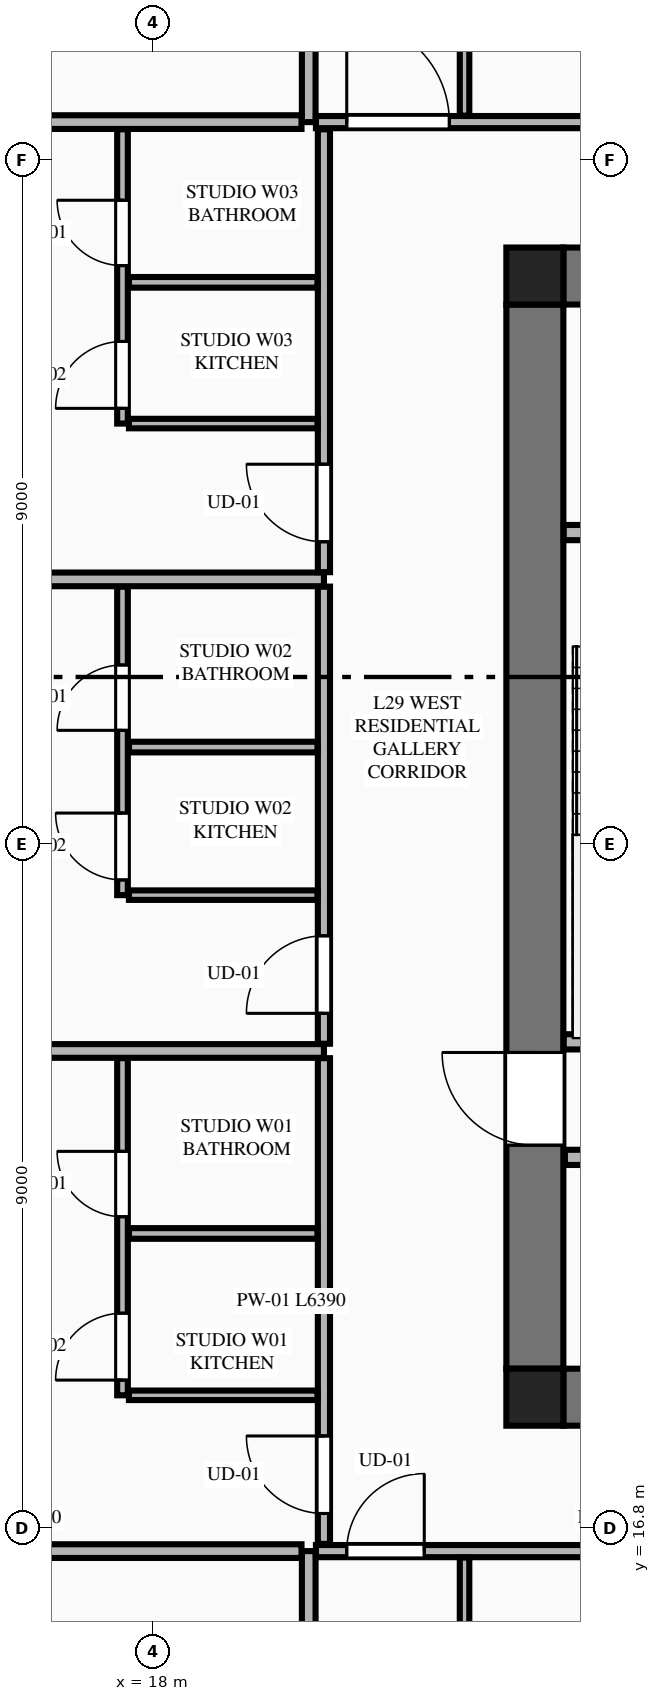
"""IFC4 building model, lengths in metres.
Left out: names, types, materials, properties, quantities, classifications, styles, units other than length and angle.
Written with IfcOpenShell. Run it as: python <this file> out.ifc"""

import sys

from ifc_helpers import new_model, si_unit, direction, frame, frame_2d, origin, origin_2d, place, context, subcontext, project, spatial, rectangle, extrude, element, fill, save


model = new_model("IFC4")
c1 = context("Model", 3, precision=1e-05, world=origin(), true_north=direction((0.0, 1.0)))
c2 = subcontext(c1, "Body", "Model", "MODEL_VIEW")
j1 = project(units=[si_unit("LENGTHUNIT", "METRE"), si_unit("PLANEANGLEUNIT", "RADIAN")], contexts=[c1])
p1 = place(None, origin())
s1 = spatial("IfcSite", under=j1, at=p1, CompositionType="ELEMENT")
p2 = place(p1, origin())
s2 = spatial("IfcBuilding", under=s1, at=p2, CompositionType="ELEMENT")
p3 = place(p2, frame((0.0, 0.0, 112.6)))
s3 = spatial("IfcBuildingStorey", under=s2, at=p3, CompositionType="ELEMENT", Elevation=112.6)
for number, where, z_axis, x_axis in (
    (1, (23.025, 18.525, 0.0), (0.0, 0.0, 1.0), (1.0, 0.0, 0.0)),
    (2, (23.025, 33.275, 0.0), (0.0, 0.0, 1.0), (1.0, 0.0, 0.0)),
):
    element("IfcColumn", number, at=place(p3, frame(where, z_axis=z_axis, x_axis=x_axis)), inside=s3, PredefinedType="COLUMN", context=c2, shape_type="SweptSolid", body=[
        extrude(rectangle(XDim=0.75, YDim=0.75, at=origin_2d()), origin(), (0.0, 0.0, 1.0), 3.55),
    ])
for number, where, z_axis, x_axis in (
    (3, (23.4, 18.525, 0.0), (0.0, 0.0, 1.0), (1.0, 0.0, 0.0)),
    (4, (23.4, 33.275, 0.0), (0.0, 0.0, 1.0), (1.0, 0.0, 0.0)),
):
    element("IfcWall", number, at=place(p3, frame(where, z_axis=z_axis, x_axis=x_axis)), inside=s3, PredefinedType="SHEAR", context=c2, shape_type="SweptSolid", body=[
        extrude(rectangle(XDim=18.0, YDim=0.75, at=frame_2d((9.0, 0.0))), origin(), (0.0, 0.0, 1.0), 3.34),
    ])
p4 = place(p3, frame((23.025, 18.9, 0.0), z_axis=(0.0, 0.0, 1.0), x_axis=(0.0, 1.0, 0.0)))
e5 = element("IfcWall", 5, at=p4, inside=s3, PredefinedType="SHEAR", context=c2, shape_type="SweptSolid", body=[
    extrude(rectangle(XDim=14.0, YDim=0.75, at=frame_2d((7.0, 0.0))), origin(), (0.0, 0.0, 1.0), 3.34),
])
p5 = place(p4, frame((2.94, 0.0, 0.0)))
e6 = element("IfcOpeningElement", 6, at=p5, cuts=e5, PredefinedType="OPENING", context=c2, shape_type="SweptSolid", body=[
    extrude(rectangle(XDim=1.22, YDim=2.25, at=frame_2d((0.61, 1.125))), frame((0.0, 0.385, 0.0), z_axis=(0.0, -1.0, 0.0), x_axis=(1.0, 0.0, 0.0)), (0.0, 0.0, 1.0), 0.77),
])
p6 = place(p3, frame((23.405, 23.2, 0.0), z_axis=(0.0, 0.0, 1.0), x_axis=(1.0, 0.0, 0.0)))
e7 = element("IfcWall", 7, at=p6, inside=s3, PredefinedType="PLUMBINGWALL", context=c2, shape_type="SweptSolid", body=[
    extrude(rectangle(XDim=3.27, YDim=0.2, at=frame_2d((1.635, 0.0))), origin(), (0.0, 0.0, 1.0), 3.34),
])
p7 = place(p3, frame((23.405, 29.9, 0.0), z_axis=(0.0, 0.0, 1.0), x_axis=(1.0, 0.0, 0.0)))
e8 = element("IfcWall", 8, at=p7, inside=s3, PredefinedType="PLUMBINGWALL", context=c2, shape_type="SweptSolid", body=[
    extrude(rectangle(XDim=3.27, YDim=0.2, at=frame_2d((1.635, 0.0))), origin(), (0.0, 0.0, 1.0), 3.34),
])
p8 = place(p7, frame((1.85, 0.0, 0.0)))
e9 = element("IfcOpeningElement", 9, at=p8, cuts=e8, PredefinedType="OPENING", context=c2, shape_type="SweptSolid", body=[
    extrude(rectangle(XDim=0.85, YDim=2.05, at=frame_2d((0.425, 1.025))), frame((0.0, 0.11, 0.0), z_axis=(0.0, -1.0, 0.0), x_axis=(1.0, 0.0, 0.0)), (0.0, 0.0, 1.0), 0.22),
])
p9 = place(p3, frame((23.42, 21.68, 0.0), z_axis=(0.0, 0.0, 1.0), x_axis=(1.0, 0.0, 0.0)))
e10 = element("IfcWall", 10, at=p9, inside=s3, PredefinedType="PLUMBINGWALL", context=c2, shape_type="SweptSolid", body=[
    extrude(rectangle(XDim=17.96, YDim=0.2, at=frame_2d((8.98, 0.0))), origin(), (0.0, 0.0, 1.0), 3.34),
])
p10 = place(p9, frame((11.6, 0.0, 0.0)))
e11 = element("IfcOpeningElement", 11, at=p10, cuts=e10, PredefinedType="OPENING", context=c2, shape_type="SweptSolid", body=[
    extrude(rectangle(XDim=1.1, YDim=2.2, at=frame_2d((0.55, 1.1))), frame((0.0, 0.11, 0.0), z_axis=(0.0, -1.0, 0.0), x_axis=(1.0, 0.0, 0.0)), (0.0, 0.0, 1.0), 0.22),
])
p11 = place(p9, frame((0.41, 0.0, 0.0)))
e12 = element("IfcOpeningElement", 12, at=p11, cuts=e10, PredefinedType="OPENING", context=c2, shape_type="SweptSolid", body=[
    extrude(rectangle(XDim=0.85, YDim=2.05, at=frame_2d((0.425, 1.025))), frame((0.0, 0.11, 0.0), z_axis=(0.0, -1.0, 0.0), x_axis=(1.0, 0.0, 0.0)), (0.0, 0.0, 1.0), 0.22),
])
p12 = place(p9, frame((13.78, 0.0, 0.0)))
e13 = element("IfcOpeningElement", 13, at=p12, cuts=e10, PredefinedType="OPENING", context=c2, shape_type="SweptSolid", body=[
    extrude(rectangle(XDim=0.85, YDim=2.05, at=frame_2d((0.425, 1.025))), frame((0.0, 0.11, 0.0), z_axis=(0.0, -1.0, 0.0), x_axis=(1.0, 0.0, 0.0)), (0.0, 0.0, 1.0), 0.22),
])
p13 = place(p9, frame((16.13, 0.0, 0.0)))
e14 = element("IfcOpeningElement", 14, at=p13, cuts=e10, PredefinedType="OPENING", context=c2, shape_type="SweptSolid", body=[
    extrude(rectangle(XDim=0.85, YDim=2.05, at=frame_2d((0.425, 1.025))), frame((0.0, 0.11, 0.0), z_axis=(0.0, -1.0, 0.0), x_axis=(1.0, 0.0, 0.0)), (0.0, 0.0, 1.0), 0.22),
])
p14 = place(p3, frame((20.05, 4.105, 0.0), z_axis=(0.0, 0.0, 1.0), x_axis=(0.0, 1.0, 0.0)))
e15 = element("IfcWall", 15, at=p14, inside=s3, PredefinedType="PARTITIONING", context=c2, shape_type="SweptSolid", body=[
    extrude(rectangle(XDim=12.395, YDim=0.18, at=frame_2d((6.198, 0.0))), origin(), (0.0, 0.0, 1.0), 3.34),
])
p15 = place(p3, frame((20.145, 16.5, 0.0), z_axis=(0.0, 0.0, 1.0), x_axis=(1.0, 0.0, 0.0)))
e16 = element("IfcWall", 16, at=p15, inside=s3, PredefinedType="PARTITIONING", context=c2, shape_type="SweptSolid", body=[
    extrude(rectangle(XDim=8.328, YDim=0.16, at=frame_2d((4.164, 0.0))), origin(), (0.0, 0.0, 1.0), 3.34),
])
p16 = place(p15, frame((0.405, 0.0, 0.0)))
e17 = element("IfcOpeningElement", 17, at=p16, cuts=e16, PredefinedType="OPENING", context=c2, shape_type="SweptSolid", body=[
    extrude(rectangle(XDim=1.02, YDim=2.25, at=frame_2d((0.51, 1.125))), frame((0.0, 0.09, 0.0), z_axis=(0.0, -1.0, 0.0), x_axis=(1.0, 0.0, 0.0)), (0.0, 0.0, 1.0), 0.18),
])
p17 = place(p3, frame((22.1, 12.391, 0.0), z_axis=(0.0, 0.0, 1.0), x_axis=(0.0, 1.0, 0.0)))
e18 = element("IfcWall", 18, at=p17, inside=s3, PredefinedType="PARTITIONING", context=c2, shape_type="SweptSolid", body=[
    extrude(rectangle(XDim=4.024, YDim=0.125, at=frame_2d((2.012, 0.0))), origin(), (0.0, 0.0, 1.0), 2.722),
])
p18 = place(p3, frame((20.05, 35.3, 0.0), z_axis=(0.0, 0.0, 1.0), x_axis=(0.0, 1.0, 0.0)))
e19 = element("IfcWall", 19, at=p18, inside=s3, PredefinedType="PARTITIONING", context=c2, shape_type="SweptSolid", body=[
    extrude(rectangle(XDim=12.195, YDim=0.18, at=frame_2d((6.098, 0.0))), origin(), (0.0, 0.0, 1.0), 3.34),
])
p19 = place(p3, frame((20.145, 35.3, 0.0), z_axis=(0.0, 0.0, 1.0), x_axis=(1.0, 0.0, 0.0)))
e20 = element("IfcWall", 20, at=p19, inside=s3, PredefinedType="PARTITIONING", context=c2, shape_type="SweptSolid", body=[
    extrude(rectangle(XDim=24.51, YDim=0.16, at=frame_2d((12.255, 0.0))), origin(), (0.0, 0.0, 1.0), 3.34),
])
p20 = place(p19, frame((0.405, 0.0, 0.0)))
e21 = element("IfcOpeningElement", 21, at=p20, cuts=e20, PredefinedType="OPENING", context=c2, shape_type="SweptSolid", body=[
    extrude(rectangle(XDim=1.35, YDim=2.35, at=frame_2d((0.675, 1.175))), frame((0.0, 0.09, 0.0), z_axis=(0.0, -1.0, 0.0), x_axis=(1.0, 0.0, 0.0)), (0.0, 0.0, 1.0), 0.18),
])
p21 = place(p3, frame((22.1, 35.385, 0.0), z_axis=(0.0, 0.0, 1.0), x_axis=(0.0, 1.0, 0.0)))
e22 = element("IfcWall", 22, at=p21, inside=s3, PredefinedType="PARTITIONING", context=c2, shape_type="SweptSolid", body=[
    extrude(rectangle(XDim=6.395, YDim=0.125, at=frame_2d((3.198, 0.0))), origin(), (0.0, 0.0, 1.0), 2.722),
])
p22 = place(p3, frame((12.185, 16.5, 0.0), z_axis=(0.0, 0.0, 1.0), x_axis=(1.0, 0.0, 0.0)))
e23 = element("IfcWall", 23, at=p22, inside=s3, PredefinedType="PARTITIONING", context=c2, shape_type="SweptSolid", body=[
    extrude(rectangle(XDim=7.77, YDim=0.18, at=frame_2d((3.885, 0.0))), origin(), (0.0, 0.0, 1.0), 3.34),
])
p23 = place(p3, frame((12.286, 35.3, 0.0), z_axis=(0.0, 0.0, 1.0), x_axis=(1.0, 0.0, 0.0)))
e24 = element("IfcWall", 24, at=p23, inside=s3, PredefinedType="PARTITIONING", context=c2, shape_type="SweptSolid", body=[
    extrude(rectangle(XDim=7.669, YDim=0.18, at=frame_2d((3.834, 0.0))), origin(), (0.0, 0.0, 1.0), 3.34),
])
p24 = place(p3, frame((20.25, 16.595, 0.0), z_axis=(0.0, 0.0, 1.0), x_axis=(0.0, 1.0, 0.0)))
e25 = element("IfcWall", 25, at=p24, inside=s3, PredefinedType="PARTITIONING", context=c2, shape_type="SweptSolid", body=[
    extrude(rectangle(XDim=6.39, YDim=0.16, at=frame_2d((3.195, 0.0))), origin(), (0.0, 0.0, 1.0), 3.34),
])
p25 = place(p24, frame((0.4, 0.0, 0.0)))
e26 = element("IfcOpeningElement", 26, at=p25, cuts=e25, PredefinedType="OPENING", context=c2, shape_type="SweptSolid", body=[
    extrude(rectangle(XDim=1.02, YDim=2.25, at=frame_2d((0.51, 1.125))), frame((0.0, 0.09, 0.0), z_axis=(0.0, -1.0, 0.0), x_axis=(1.0, 0.0, 0.0)), (0.0, 0.0, 1.0), 0.18),
])
p26 = place(p3, frame((17.685, 18.55, 0.0), z_axis=(0.0, 0.0, 1.0), x_axis=(1.0, 0.0, 0.0)))
e27 = element("IfcWall", 27, at=p26, inside=s3, PredefinedType="PARTITIONING", context=c2, shape_type="SweptSolid", body=[
    extrude(rectangle(XDim=2.48, YDim=0.125, at=frame_2d((1.24, 0.0))), origin(), (0.0, 0.0, 1.0), 2.722),
])
p27 = place(p3, frame((17.6, 18.55, 0.0), z_axis=(0.0, 0.0, 1.0), x_axis=(0.0, 1.0, 0.0)))
e28 = element("IfcWall", 28, at=p27, inside=s3, PredefinedType="PLUMBINGWALL", context=c2, shape_type="SweptSolid", body=[
    extrude(rectangle(XDim=4.435, YDim=0.14, at=frame_2d((2.218, 0.0))), origin(), (0.0, 0.0, 1.0), 3.34),
])
p28 = place(p27, frame((2.349, 0.0, 0.0)))
e29 = element("IfcOpeningElement", 29, at=p28, cuts=e28, PredefinedType="OPENING", context=c2, shape_type="SweptSolid", body=[
    extrude(rectangle(XDim=0.86, YDim=2.1, at=frame_2d((0.43, 1.05))), frame((0.0, 0.08, 0.0), z_axis=(0.0, -1.0, 0.0), x_axis=(1.0, 0.0, 0.0)), (0.0, 0.0, 1.0), 0.16),
])
p29 = place(p27, frame((0.2, 0.0, 0.0)))
e30 = element("IfcOpeningElement", 30, at=p29, cuts=e28, PredefinedType="OPENING", context=c2, shape_type="SweptSolid", body=[
    extrude(rectangle(XDim=0.88, YDim=2.15, at=frame_2d((0.44, 1.075))), frame((0.0, 0.08, 0.0), z_axis=(0.0, -1.0, 0.0), x_axis=(1.0, 0.0, 0.0)), (0.0, 0.0, 1.0), 0.16),
])
p30 = place(p3, frame((17.685, 20.679, 0.0), z_axis=(0.0, 0.0, 1.0), x_axis=(1.0, 0.0, 0.0)))
e31 = element("IfcWall", 31, at=p30, inside=s3, PredefinedType="PLUMBINGWALL", context=c2, shape_type="SweptSolid", body=[
    extrude(rectangle(XDim=2.48, YDim=0.14, at=frame_2d((1.24, 0.0))), origin(), (0.0, 0.0, 1.0), 3.34),
])
p31 = place(p3, frame((8.856, 23.08, 0.0), z_axis=(0.0, 0.0, 1.0), x_axis=(1.0, 0.0, 0.0)))
e32 = element("IfcWall", 32, at=p31, inside=s3, PredefinedType="PARTITIONING", context=c2, shape_type="SweptSolid", body=[
    extrude(rectangle(XDim=11.394, YDim=0.18, at=frame_2d((5.697, 0.0))), origin(), (0.0, 0.0, 1.0), 3.34),
])
p32 = place(p3, frame((20.25, 23.175, 0.0), z_axis=(0.0, 0.0, 1.0), x_axis=(0.0, 1.0, 0.0)))
e33 = element("IfcWall", 33, at=p32, inside=s3, PredefinedType="PARTITIONING", context=c2, shape_type="SweptSolid", body=[
    extrude(rectangle(XDim=6.014, YDim=0.16, at=frame_2d((3.007, 0.0))), origin(), (0.0, 0.0, 1.0), 3.34),
])
p33 = place(p32, frame((0.4, 0.0, 0.0)))
e34 = element("IfcOpeningElement", 34, at=p33, cuts=e33, PredefinedType="OPENING", context=c2, shape_type="SweptSolid", body=[
    extrude(rectangle(XDim=1.02, YDim=2.25, at=frame_2d((0.51, 1.125))), frame((0.0, 0.09, 0.0), z_axis=(0.0, -1.0, 0.0), x_axis=(1.0, 0.0, 0.0)), (0.0, 0.0, 1.0), 0.18),
])
p34 = place(p3, frame((17.685, 25.13, 0.0), z_axis=(0.0, 0.0, 1.0), x_axis=(1.0, 0.0, 0.0)))
e35 = element("IfcWall", 35, at=p34, inside=s3, PredefinedType="PARTITIONING", context=c2, shape_type="SweptSolid", body=[
    extrude(rectangle(XDim=2.48, YDim=0.125, at=frame_2d((1.24, 0.0))), origin(), (0.0, 0.0, 1.0), 3.34),
])
p35 = place(p3, frame((17.6, 25.13, 0.0), z_axis=(0.0, 0.0, 1.0), x_axis=(0.0, 1.0, 0.0)))
e36 = element("IfcWall", 36, at=p35, inside=s3, PredefinedType="PLUMBINGWALL", context=c2, shape_type="SweptSolid", body=[
    extrude(rectangle(XDim=4.059, YDim=0.14, at=frame_2d((2.03, 0.0))), origin(), (0.0, 0.0, 1.0), 3.34),
])
p36 = place(p35, frame((2.168, 0.0, 0.0)))
e37 = element("IfcOpeningElement", 37, at=p36, cuts=e36, PredefinedType="OPENING", context=c2, shape_type="SweptSolid", body=[
    extrude(rectangle(XDim=0.86, YDim=2.1, at=frame_2d((0.43, 1.05))), frame((0.0, 0.08, 0.0), z_axis=(0.0, -1.0, 0.0), x_axis=(1.0, 0.0, 0.0)), (0.0, 0.0, 1.0), 0.16),
])
p37 = place(p35, frame((0.2, 0.0, 0.0)))
e38 = element("IfcOpeningElement", 38, at=p37, cuts=e36, PredefinedType="OPENING", context=c2, shape_type="SweptSolid", body=[
    extrude(rectangle(XDim=0.88, YDim=2.15, at=frame_2d((0.44, 1.075))), frame((0.0, 0.08, 0.0), z_axis=(0.0, -1.0, 0.0), x_axis=(1.0, 0.0, 0.0)), (0.0, 0.0, 1.0), 0.16),
])
p38 = place(p3, frame((17.685, 27.078, 0.0), z_axis=(0.0, 0.0, 1.0), x_axis=(1.0, 0.0, 0.0)))
e39 = element("IfcWall", 39, at=p38, inside=s3, PredefinedType="PLUMBINGWALL", context=c2, shape_type="SweptSolid", body=[
    extrude(rectangle(XDim=2.48, YDim=0.14, at=frame_2d((1.24, 0.0))), origin(), (0.0, 0.0, 1.0), 3.34),
])
p39 = place(p3, frame((9.242, 29.284, 0.0), z_axis=(0.0, 0.0, 1.0), x_axis=(1.0, 0.0, 0.0)))
e40 = element("IfcWall", 40, at=p39, inside=s3, PredefinedType="PARTITIONING", context=c2, shape_type="SweptSolid", body=[
    extrude(rectangle(XDim=11.008, YDim=0.18, at=frame_2d((5.504, 0.0))), origin(), (0.0, 0.0, 1.0), 3.34),
])
p40 = place(p3, frame((20.25, 29.379, 0.0), z_axis=(0.0, 0.0, 1.0), x_axis=(0.0, 1.0, 0.0)))
e41 = element("IfcWall", 41, at=p40, inside=s3, PredefinedType="PARTITIONING", context=c2, shape_type="SweptSolid", body=[
    extrude(rectangle(XDim=5.826, YDim=0.16, at=frame_2d((2.913, 0.0))), origin(), (0.0, 0.0, 1.0), 3.34),
])
p41 = place(p40, frame((0.4, 0.0, 0.0)))
e42 = element("IfcOpeningElement", 42, at=p41, cuts=e41, PredefinedType="OPENING", context=c2, shape_type="SweptSolid", body=[
    extrude(rectangle(XDim=1.02, YDim=2.25, at=frame_2d((0.51, 1.125))), frame((0.0, 0.09, 0.0), z_axis=(0.0, -1.0, 0.0), x_axis=(1.0, 0.0, 0.0)), (0.0, 0.0, 1.0), 0.18),
])
p42 = place(p3, frame((17.685, 31.334, 0.0), z_axis=(0.0, 0.0, 1.0), x_axis=(1.0, 0.0, 0.0)))
e43 = element("IfcWall", 43, at=p42, inside=s3, PredefinedType="PARTITIONING", context=c2, shape_type="SweptSolid", body=[
    extrude(rectangle(XDim=2.48, YDim=0.125, at=frame_2d((1.24, 0.0))), origin(), (0.0, 0.0, 1.0), 3.34),
])
p43 = place(p3, frame((17.6, 31.334, 0.0), z_axis=(0.0, 0.0, 1.0), x_axis=(0.0, 1.0, 0.0)))
e44 = element("IfcWall", 44, at=p43, inside=s3, PredefinedType="PLUMBINGWALL", context=c2, shape_type="SweptSolid", body=[
    extrude(rectangle(XDim=3.871, YDim=0.14, at=frame_2d((1.936, 0.0))), origin(), (0.0, 0.0, 1.0), 3.34),
])
p44 = place(p43, frame((2.078, 0.0, 0.0)))
e45 = element("IfcOpeningElement", 45, at=p44, cuts=e44, PredefinedType="OPENING", context=c2, shape_type="SweptSolid", body=[
    extrude(rectangle(XDim=0.86, YDim=2.1, at=frame_2d((0.43, 1.05))), frame((0.0, 0.08, 0.0), z_axis=(0.0, -1.0, 0.0), x_axis=(1.0, 0.0, 0.0)), (0.0, 0.0, 1.0), 0.16),
])
p45 = place(p43, frame((0.2, 0.0, 0.0)))
e46 = element("IfcOpeningElement", 46, at=p45, cuts=e44, PredefinedType="OPENING", context=c2, shape_type="SweptSolid", body=[
    extrude(rectangle(XDim=0.88, YDim=2.15, at=frame_2d((0.44, 1.075))), frame((0.0, 0.08, 0.0), z_axis=(0.0, -1.0, 0.0), x_axis=(1.0, 0.0, 0.0)), (0.0, 0.0, 1.0), 0.16),
])
p46 = place(p3, frame((17.685, 33.192, 0.0), z_axis=(0.0, 0.0, 1.0), x_axis=(1.0, 0.0, 0.0)))
e47 = element("IfcWall", 47, at=p46, inside=s3, PredefinedType="PLUMBINGWALL", context=c2, shape_type="SweptSolid", body=[
    extrude(rectangle(XDim=2.48, YDim=0.14, at=frame_2d((1.24, 0.0))), origin(), (0.0, 0.0, 1.0), 2.722),
])
p47 = place(p5, origin())
e48 = element("IfcDoor", 48, at=p47, inside=s3, OperationType="SINGLE_SWING_RIGHT", PredefinedType="DOOR", context=c2, shape_type="SweptSolid", body=[
    extrude(rectangle(XDim=1.22, YDim=2.25, at=frame_2d((0.61, 1.125))), frame((0.0, 0.025, 0.0), z_axis=(0.0, -1.0, 0.0), x_axis=(1.0, 0.0, 0.0)), (0.0, 0.0, 1.0), 0.05),
])
fill(e6, e48)
p48 = place(p16, origin())
e49 = element("IfcDoor", 49, at=p48, inside=s3, OperationType="SINGLE_SWING_RIGHT", PredefinedType="DOOR", context=c2, shape_type="SweptSolid", body=[
    extrude(rectangle(XDim=1.02, YDim=2.25, at=frame_2d((0.51, 1.125))), frame((0.0, 0.025, 0.0), z_axis=(0.0, -1.0, 0.0), x_axis=(1.0, 0.0, 0.0)), (0.0, 0.0, 1.0), 0.05),
])
fill(e17, e49)
p49 = place(p20, origin())
e50 = element("IfcDoor", 50, at=p49, inside=s3, OperationType="SINGLE_SWING_LEFT", PredefinedType="DOOR", context=c2, shape_type="SweptSolid", body=[
    extrude(rectangle(XDim=1.35, YDim=2.35, at=frame_2d((0.675, 1.175))), frame((0.0, 0.025, 0.0), z_axis=(0.0, -1.0, 0.0), x_axis=(1.0, 0.0, 0.0)), (0.0, 0.0, 1.0), 0.05),
])
fill(e21, e50)
p50 = place(p28, origin())
e51 = element("IfcDoor", 51, at=p50, inside=s3, OperationType="SINGLE_SWING_RIGHT", PredefinedType="DOOR", context=c2, shape_type="SweptSolid", body=[
    extrude(rectangle(XDim=0.86, YDim=2.1, at=frame_2d((0.43, 1.05))), frame((0.0, 0.025, 0.0), z_axis=(0.0, -1.0, 0.0), x_axis=(1.0, 0.0, 0.0)), (0.0, 0.0, 1.0), 0.05),
])
fill(e29, e51)
p51 = place(p25, origin())
e52 = element("IfcDoor", 52, at=p51, inside=s3, OperationType="SINGLE_SWING_RIGHT", PredefinedType="DOOR", context=c2, shape_type="SweptSolid", body=[
    extrude(rectangle(XDim=1.02, YDim=2.25, at=frame_2d((0.51, 1.125))), frame((0.0, 0.025, 0.0), z_axis=(0.0, -1.0, 0.0), x_axis=(1.0, 0.0, 0.0)), (0.0, 0.0, 1.0), 0.05),
])
fill(e26, e52)
p52 = place(p29, origin())
e53 = element("IfcDoor", 53, at=p52, inside=s3, OperationType="SINGLE_SWING_LEFT", PredefinedType="DOOR", context=c2, shape_type="SweptSolid", body=[
    extrude(rectangle(XDim=0.88, YDim=2.15, at=frame_2d((0.44, 1.075))), frame((0.0, 0.025, 0.0), z_axis=(0.0, -1.0, 0.0), x_axis=(1.0, 0.0, 0.0)), (0.0, 0.0, 1.0), 0.05),
])
fill(e30, e53)
p53 = place(p36, origin())
e54 = element("IfcDoor", 54, at=p53, inside=s3, OperationType="SINGLE_SWING_LEFT", PredefinedType="DOOR", context=c2, shape_type="SweptSolid", body=[
    extrude(rectangle(XDim=0.86, YDim=2.1, at=frame_2d((0.43, 1.05))), frame((0.0, 0.025, 0.0), z_axis=(0.0, -1.0, 0.0), x_axis=(1.0, 0.0, 0.0)), (0.0, 0.0, 1.0), 0.05),
])
fill(e37, e54)
p54 = place(p33, origin())
e55 = element("IfcDoor", 55, at=p54, inside=s3, OperationType="SINGLE_SWING_LEFT", PredefinedType="DOOR", context=c2, shape_type="SweptSolid", body=[
    extrude(rectangle(XDim=1.02, YDim=2.25, at=frame_2d((0.51, 1.125))), frame((0.0, 0.025, 0.0), z_axis=(0.0, -1.0, 0.0), x_axis=(1.0, 0.0, 0.0)), (0.0, 0.0, 1.0), 0.05),
])
fill(e34, e55)
p55 = place(p37, origin())
e56 = element("IfcDoor", 56, at=p55, inside=s3, OperationType="SINGLE_SWING_RIGHT", PredefinedType="DOOR", context=c2, shape_type="SweptSolid", body=[
    extrude(rectangle(XDim=0.88, YDim=2.15, at=frame_2d((0.44, 1.075))), frame((0.0, 0.025, 0.0), z_axis=(0.0, -1.0, 0.0), x_axis=(1.0, 0.0, 0.0)), (0.0, 0.0, 1.0), 0.05),
])
fill(e38, e56)
p56 = place(p44, origin())
e57 = element("IfcDoor", 57, at=p56, inside=s3, OperationType="SINGLE_SWING_RIGHT", PredefinedType="DOOR", context=c2, shape_type="SweptSolid", body=[
    extrude(rectangle(XDim=0.86, YDim=2.1, at=frame_2d((0.43, 1.05))), frame((0.0, 0.025, 0.0), z_axis=(0.0, -1.0, 0.0), x_axis=(1.0, 0.0, 0.0)), (0.0, 0.0, 1.0), 0.05),
])
fill(e45, e57)
p57 = place(p41, origin())
e58 = element("IfcDoor", 58, at=p57, inside=s3, OperationType="SINGLE_SWING_RIGHT", PredefinedType="DOOR", context=c2, shape_type="SweptSolid", body=[
    extrude(rectangle(XDim=1.02, YDim=2.25, at=frame_2d((0.51, 1.125))), frame((0.0, 0.025, 0.0), z_axis=(0.0, -1.0, 0.0), x_axis=(1.0, 0.0, 0.0)), (0.0, 0.0, 1.0), 0.05),
])
fill(e42, e58)
p58 = place(p45, origin())
e59 = element("IfcDoor", 59, at=p58, inside=s3, OperationType="SINGLE_SWING_LEFT", PredefinedType="DOOR", context=c2, shape_type="SweptSolid", body=[
    extrude(rectangle(XDim=0.88, YDim=2.15, at=frame_2d((0.44, 1.075))), frame((0.0, 0.025, 0.0), z_axis=(0.0, -1.0, 0.0), x_axis=(1.0, 0.0, 0.0)), (0.0, 0.0, 1.0), 0.05),
])
fill(e46, e59)
save(model, sys.argv[1])
